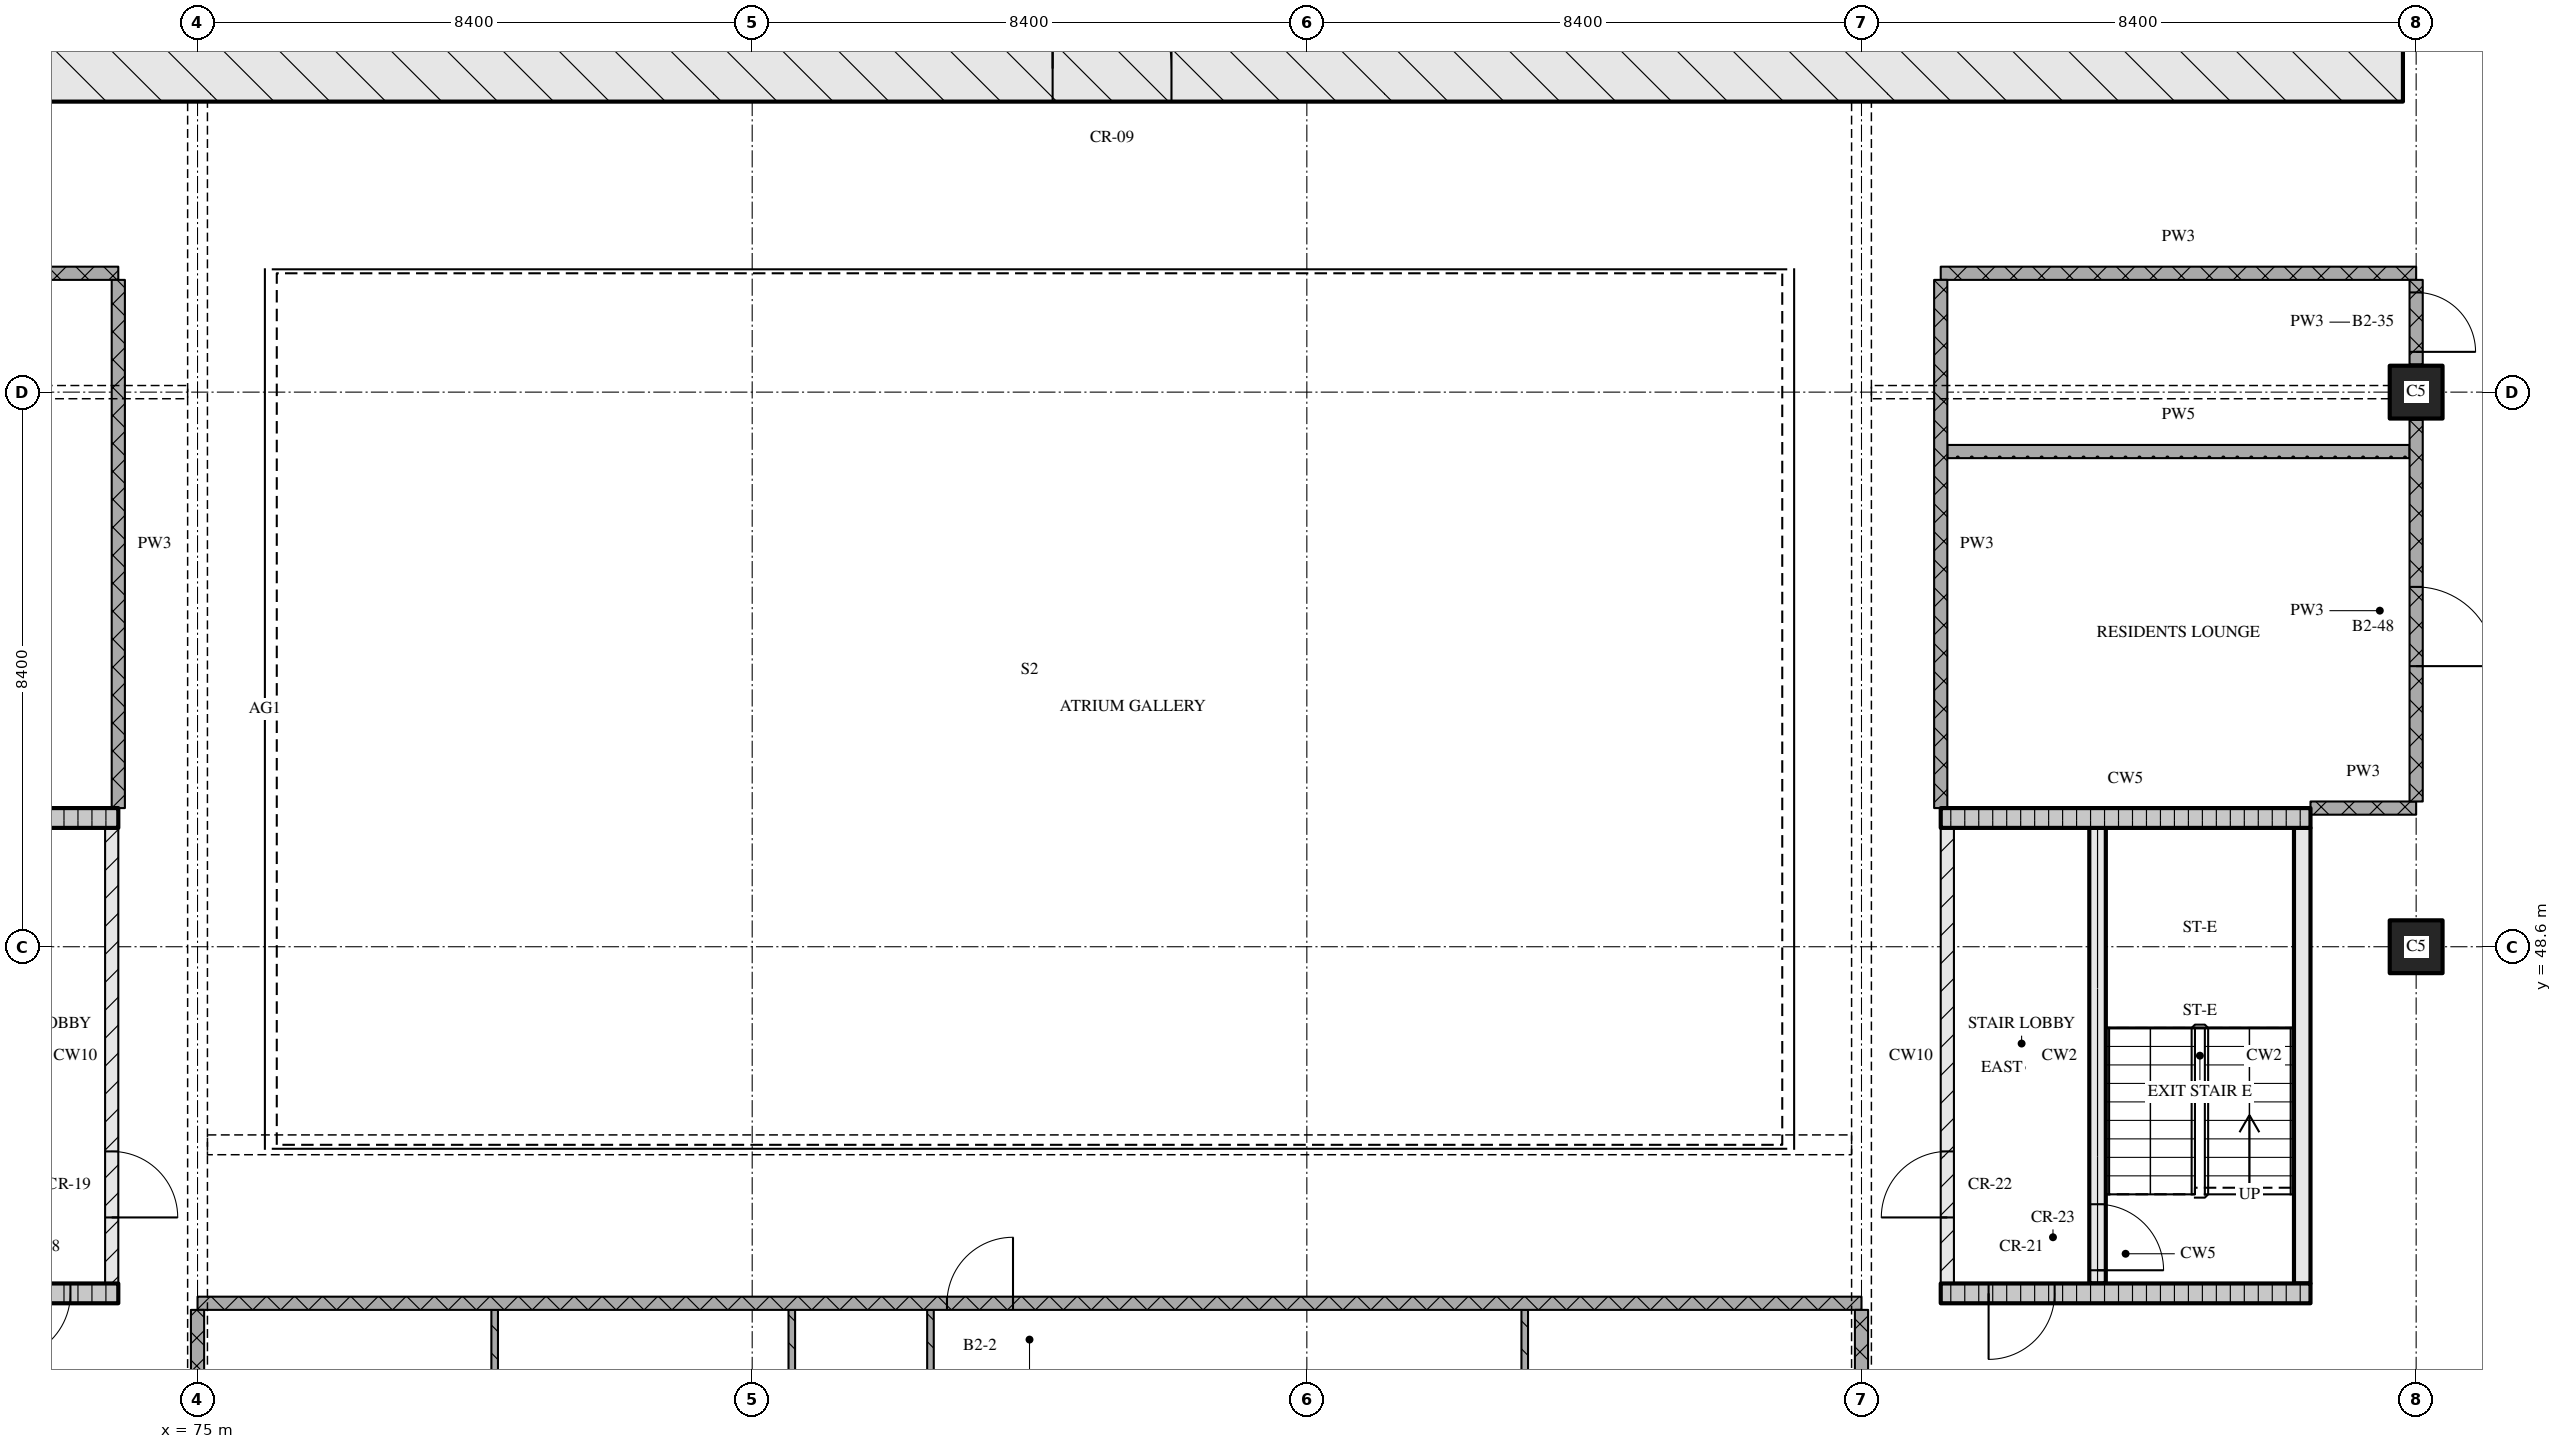
"""IFC4 building model, lengths in metres.
Left out: names, types, materials, properties, quantities, classifications, styles, units other than length and angle.
Written with IfcOpenShell. Run it as: python <this file> out.ifc"""

import sys

from ifc_helpers import new_model, si_unit, direction, frame, frame_2d, origin, origin_2d, place, context, subcontext, project, spatial, rectangle, extrude, element, fill, save


model = new_model("IFC4")
c1 = context("Model", 3, precision=1e-05, world=origin(), true_north=direction((0.0, 1.0)))
c2 = subcontext(c1, "Body", "Model", "MODEL_VIEW")
j1 = project(units=[si_unit("LENGTHUNIT", "METRE"), si_unit("PLANEANGLEUNIT", "RADIAN")], contexts=[c1])
p1 = place(None, origin())
s1 = spatial("IfcSite", under=j1, at=p1, CompositionType="ELEMENT")
p2 = place(p1, origin())
s2 = spatial("IfcBuilding", under=s1, at=p2, CompositionType="ELEMENT")
p3 = place(p2, frame((0.0, 0.0, 106.05)))
s3 = spatial("IfcBuildingStorey", under=s2, at=p3, CompositionType="ELEMENT", Elevation=106.05)
for number, where, z_axis, x_axis in (
    (1, (108.6, 48.6, 0.0), (0.0, 0.0, 1.0), (1.0, 0.0, 0.0)),
    (2, (108.6, 57.0, 0.0), (0.0, 0.0, 1.0), (1.0, 0.0, 0.0)),
):
    element("IfcColumn", number, at=place(p3, frame(where, z_axis=z_axis, x_axis=x_axis)), inside=s3, PredefinedType="COLUMN", context=c2, shape_type="SweptSolid", body=[
        extrude(rectangle(XDim=0.8, YDim=0.8, at=origin_2d()), origin(), (0.0, 0.0, 1.0), 3.6),
    ])
p4 = place(p3, frame((66.8, 61.9, 0.0), z_axis=(0.0, 0.0, 1.0), x_axis=(1.0, 0.0, 0.0)))
e3 = element("IfcWall", 3, at=p4, inside=s3, PredefinedType="SOLIDWALL", context=c2, shape_type="SweptSolid", body=[
    extrude(rectangle(XDim=41.6, YDim=1.0, at=frame_2d((20.8, 0.0))), origin(), (0.0, 0.0, 1.0), 3.32),
])
p5 = place(p4, frame((21.15, 0.0, 0.0)))
e4 = element("IfcOpeningElement", 4, at=p5, cuts=e3, PredefinedType="OPENING", context=c2, shape_type="SweptSolid", body=[
    extrude(rectangle(XDim=1.8, YDim=2.1, at=frame_2d((0.9, 1.05))), frame((0.0, 0.51, 0.0), z_axis=(0.0, -1.0, 0.0), x_axis=(1.0, 0.0, 0.0)), (0.0, 0.0, 1.0), 1.02),
])
p6 = place(p3, frame((68.2, 43.35, 0.0), z_axis=(0.0, 0.0, 1.0), x_axis=(1.0, 0.0, 0.0)))
e5 = element("IfcWall", 5, at=p6, inside=s3, PredefinedType="SOLIDWALL", context=c2, shape_type="SweptSolid", body=[
    extrude(rectangle(XDim=5.6, YDim=0.3, at=frame_2d((2.8, 0.0))), origin(), (0.0, 0.0, 1.0), 3.32),
])
p7 = place(p6, frame((3.875, 0.0, 0.0)))
e6 = element("IfcOpeningElement", 6, at=p7, cuts=e5, PredefinedType="OPENING", context=c2, shape_type="SweptSolid", body=[
    extrude(rectangle(XDim=1.0, YDim=2.1, at=frame_2d((0.5, 1.05))), frame((0.0, 0.16, 0.0), z_axis=(0.0, -1.0, 0.0), x_axis=(1.0, 0.0, 0.0)), (0.0, 0.0, 1.0), 0.32),
])
p8 = place(p3, frame((73.7, 43.5, 0.0), z_axis=(0.0, 0.0, 1.0), x_axis=(0.0, 1.0, 0.0)))
e7 = element("IfcWall", 7, at=p8, inside=s3, PredefinedType="PARTITIONING", context=c2, shape_type="SweptSolid", body=[
    extrude(rectangle(XDim=6.9, YDim=0.2, at=frame_2d((3.45, 0.0))), origin(), (0.0, 0.0, 1.0), 3.32),
])
p9 = place(p8, frame((1.0, 0.0, 0.0)))
e8 = element("IfcOpeningElement", 8, at=p9, cuts=e7, PredefinedType="OPENING", context=c2, shape_type="SweptSolid", body=[
    extrude(rectangle(XDim=1.0, YDim=2.1, at=frame_2d((0.5, 1.05))), frame((0.0, 0.11, 0.0), z_axis=(0.0, -1.0, 0.0), x_axis=(1.0, 0.0, 0.0)), (0.0, 0.0, 1.0), 0.22),
])
p10 = place(p3, frame((68.2, 50.55, 0.0), z_axis=(0.0, 0.0, 1.0), x_axis=(1.0, 0.0, 0.0)))
e9 = element("IfcWall", 9, at=p10, inside=s3, PredefinedType="SOLIDWALL", context=c2, shape_type="SweptSolid", body=[
    extrude(rectangle(XDim=5.6, YDim=0.3, at=frame_2d((2.8, 0.0))), origin(), (0.0, 0.0, 1.0), 3.32),
])
p11 = place(p3, frame((101.4, 43.35, 0.0), z_axis=(0.0, 0.0, 1.0), x_axis=(1.0, 0.0, 0.0)))
e10 = element("IfcWall", 10, at=p11, inside=s3, PredefinedType="SOLIDWALL", context=c2, shape_type="SweptSolid", body=[
    extrude(rectangle(XDim=5.6, YDim=0.3, at=frame_2d((2.8, 0.0))), origin(), (0.0, 0.0, 1.0), 3.32),
])
p12 = place(p11, frame((0.725, 0.0, 0.0)))
e11 = element("IfcOpeningElement", 11, at=p12, cuts=e10, PredefinedType="OPENING", context=c2, shape_type="SweptSolid", body=[
    extrude(rectangle(XDim=1.0, YDim=2.1, at=frame_2d((0.5, 1.05))), frame((0.0, 0.16, 0.0), z_axis=(0.0, -1.0, 0.0), x_axis=(1.0, 0.0, 0.0)), (0.0, 0.0, 1.0), 0.32),
])
p13 = place(p3, frame((101.5, 43.5, 0.0), z_axis=(0.0, 0.0, 1.0), x_axis=(0.0, 1.0, 0.0)))
e12 = element("IfcWall", 12, at=p13, inside=s3, PredefinedType="PARTITIONING", context=c2, shape_type="SweptSolid", body=[
    extrude(rectangle(XDim=6.9, YDim=0.2, at=frame_2d((3.45, 0.0))), origin(), (0.0, 0.0, 1.0), 3.32),
])
p14 = place(p13, frame((1.0, 0.0, 0.0)))
e13 = element("IfcOpeningElement", 13, at=p14, cuts=e12, PredefinedType="OPENING", context=c2, shape_type="SweptSolid", body=[
    extrude(rectangle(XDim=1.0, YDim=2.1, at=frame_2d((0.5, 1.05))), frame((0.0, 0.11, 0.0), z_axis=(0.0, -1.0, 0.0), x_axis=(1.0, 0.0, 0.0)), (0.0, 0.0, 1.0), 0.22),
])
p15 = place(p3, frame((103.775, 43.5, 0.0), z_axis=(0.0, 0.0, 1.0), x_axis=(0.0, 1.0, 0.0)))
e14 = element("IfcWall", 14, at=p15, inside=s3, PredefinedType="SOLIDWALL", context=c2, shape_type="SweptSolid", body=[
    extrude(rectangle(XDim=6.9, YDim=0.25, at=frame_2d((3.45, 0.0))), origin(), (0.0, 0.0, 1.0), 3.32),
])
p16 = place(p15, frame((0.2, 0.0, 0.0)))
e15 = element("IfcOpeningElement", 15, at=p16, cuts=e14, PredefinedType="OPENING", context=c2, shape_type="SweptSolid", body=[
    extrude(rectangle(XDim=1.0, YDim=2.1, at=frame_2d((0.5, 1.05))), frame((0.0, 0.135, 0.0), z_axis=(0.0, -1.0, 0.0), x_axis=(1.0, 0.0, 0.0)), (0.0, 0.0, 1.0), 0.27),
])
p17 = place(p3, frame((106.875, 43.5, 0.0), z_axis=(0.0, 0.0, 1.0), x_axis=(0.0, 1.0, 0.0)))
e16 = element("IfcWall", 16, at=p17, inside=s3, PredefinedType="SOLIDWALL", context=c2, shape_type="SweptSolid", body=[
    extrude(rectangle(XDim=6.9, YDim=0.25, at=frame_2d((3.45, 0.0))), origin(), (0.0, 0.0, 1.0), 3.32),
])
p18 = place(p3, frame((101.4, 50.55, 0.0), z_axis=(0.0, 0.0, 1.0), x_axis=(1.0, 0.0, 0.0)))
e17 = element("IfcWall", 17, at=p18, inside=s3, PredefinedType="SOLIDWALL", context=c2, shape_type="SweptSolid", body=[
    extrude(rectangle(XDim=5.6, YDim=0.3, at=frame_2d((2.8, 0.0))), origin(), (0.0, 0.0, 1.0), 3.32),
])
p19 = place(p3, frame((100.2, 43.2, 0.0), z_axis=(0.0, 0.0, 1.0), x_axis=(-1.0, 0.0, 0.0)))
e18 = element("IfcWall", 18, at=p19, inside=s3, PredefinedType="PARTITIONING", context=c2, shape_type="SweptSolid", body=[
    extrude(rectangle(XDim=25.2, YDim=0.2, at=frame_2d((12.6, 0.0))), origin(), (0.0, 0.0, 1.0), 3.32),
])
p20 = place(p19, frame((12.85, 0.0, 0.0)))
e19 = element("IfcOpeningElement", 19, at=p20, cuts=e18, PredefinedType="OPENING", context=c2, shape_type="SweptSolid", body=[
    extrude(rectangle(XDim=1.0, YDim=2.1, at=frame_2d((0.5, 1.05))), frame((0.0, 0.11, 0.0), z_axis=(0.0, -1.0, 0.0), x_axis=(1.0, 0.0, 0.0)), (0.0, 0.0, 1.0), 0.22),
])
p21 = place(p3, frame((107.0, 50.7, 0.0), z_axis=(0.0, 0.0, 1.0), x_axis=(1.0, 0.0, 0.0)))
e20 = element("IfcWall", 20, at=p21, inside=s3, PredefinedType="PARTITIONING", context=c2, shape_type="SweptSolid", body=[
    extrude(rectangle(XDim=1.6, YDim=0.2, at=frame_2d((0.8, 0.0))), origin(), (0.0, 0.0, 1.0), 3.32),
])
p22 = place(p3, frame((101.5, 56.1, 0.0), z_axis=(0.0, 0.0, 1.0), x_axis=(1.0, 0.0, 0.0)))
e21 = element("IfcWall", 21, at=p22, inside=s3, PredefinedType="PARTITIONING", context=c2, shape_type="SweptSolid", body=[
    extrude(rectangle(XDim=7.0, YDim=0.2, at=frame_2d((3.5, 0.0))), origin(), (0.0, 0.0, 1.0), 3.32),
])
p23 = place(p3, frame((73.8, 58.8, 0.0), z_axis=(0.0, 0.0, 1.0), x_axis=(-1.0, 0.0, 0.0)))
e22 = element("IfcWall", 22, at=p23, inside=s3, PredefinedType="PARTITIONING", context=c2, shape_type="SweptSolid", body=[
    extrude(rectangle(XDim=7.2, YDim=0.2, at=frame_2d((3.6, 0.0))), origin(), (0.0, 0.0, 1.0), 3.32),
])
p24 = place(p23, frame((3.0, 0.0, 0.0)))
e23 = element("IfcOpeningElement", 23, at=p24, cuts=e22, PredefinedType="OPENING", context=c2, shape_type="SweptSolid", body=[
    extrude(rectangle(XDim=1.2, YDim=2.1, at=frame_2d((0.6, 1.05))), frame((0.0, 0.11, 0.0), z_axis=(0.0, -1.0, 0.0), x_axis=(1.0, 0.0, 0.0)), (0.0, 0.0, 1.0), 0.22),
])
p25 = place(p3, frame((101.4, 58.8, 0.0), z_axis=(0.0, 0.0, 1.0), x_axis=(1.0, 0.0, 0.0)))
e24 = element("IfcWall", 24, at=p25, inside=s3, PredefinedType="PARTITIONING", context=c2, shape_type="SweptSolid", body=[
    extrude(rectangle(XDim=7.2, YDim=0.2, at=frame_2d((3.6, 0.0))), origin(), (0.0, 0.0, 1.0), 3.32),
])
p26 = place(p3, frame((73.8, 58.7, 0.0), z_axis=(0.0, 0.0, 1.0), x_axis=(0.0, -1.0, 0.0)))
e25 = element("IfcWall", 25, at=p26, inside=s3, PredefinedType="PARTITIONING", context=c2, shape_type="SweptSolid", body=[
    extrude(rectangle(XDim=8.0, YDim=0.2, at=frame_2d((4.0, 0.0))), origin(), (0.0, 0.0, 1.0), 3.32),
])
p27 = place(p3, frame((75.0, 43.1, 0.0), z_axis=(0.0, 0.0, 1.0), x_axis=(0.0, -1.0, 0.0)))
e26 = element("IfcWall", 26, at=p27, inside=s3, PredefinedType="PARTITIONING", context=c2, shape_type="SweptSolid", body=[
    extrude(rectangle(XDim=2.2, YDim=0.2, at=frame_2d((1.1, 0.0))), origin(), (0.0, 0.0, 1.0), 2.43),
])
for number, where, z_axis, x_axis in (
    (27, (79.5, 43.1, 0.0), (0.0, 0.0, 1.0), (0.0, -1.0, 0.0)),
    (28, (84.0, 43.1, 0.0), (0.0, 0.0, 1.0), (0.0, -1.0, 0.0)),
):
    element("IfcWall", number, at=place(p3, frame(where, z_axis=z_axis, x_axis=x_axis)), inside=s3, PredefinedType="PARTITIONING", context=c2, shape_type="SweptSolid", body=[
        extrude(rectangle(XDim=4.35, YDim=0.1, at=frame_2d((2.175, 0.0))), origin(), (0.0, 0.0, 1.0), 3.32),
    ])
p28 = place(p3, frame((86.1, 38.75, 0.0), z_axis=(0.0, 0.0, 1.0), x_axis=(0.0, 1.0, 0.0)))
e29 = element("IfcWall", 29, at=p28, inside=s3, PredefinedType="PARTITIONING", context=c2, shape_type="SweptSolid", body=[
    extrude(rectangle(XDim=4.35, YDim=0.1, at=frame_2d((2.175, 0.0))), origin(), (0.0, 0.0, 1.0), 3.32),
])
p29 = place(p28, frame((1.75, 0.0, 0.0)))
e30 = element("IfcOpeningElement", 30, at=p29, cuts=e29, PredefinedType="OPENING", context=c2, shape_type="SweptSolid", body=[
    extrude(rectangle(XDim=0.9, YDim=2.1, at=frame_2d((0.45, 1.05))), frame((0.0, 0.06, 0.0), z_axis=(0.0, -1.0, 0.0), x_axis=(1.0, 0.0, 0.0)), (0.0, 0.0, 1.0), 0.12),
])
p30 = place(p3, frame((95.1, 43.1, 0.0), z_axis=(0.0, 0.0, 1.0), x_axis=(0.0, -1.0, 0.0)))
e31 = element("IfcWall", 31, at=p30, inside=s3, PredefinedType="PARTITIONING", context=c2, shape_type="SweptSolid", body=[
    extrude(rectangle(XDim=4.35, YDim=0.1, at=frame_2d((2.175, 0.0))), origin(), (0.0, 0.0, 1.0), 3.32),
])
p31 = place(p3, frame((100.2, 43.1, 0.0), z_axis=(0.0, 0.0, 1.0), x_axis=(0.0, -1.0, 0.0)))
e32 = element("IfcWall", 32, at=p31, inside=s3, PredefinedType="PARTITIONING", context=c2, shape_type="SweptSolid", body=[
    extrude(rectangle(XDim=2.2, YDim=0.2, at=frame_2d((1.1, 0.0))), origin(), (0.0, 0.0, 1.0), 2.43),
])
p32 = place(p3, frame((101.4, 58.7, 0.0), z_axis=(0.0, 0.0, 1.0), x_axis=(0.0, -1.0, 0.0)))
e33 = element("IfcWall", 33, at=p32, inside=s3, PredefinedType="PARTITIONING", context=c2, shape_type="SweptSolid", body=[
    extrude(rectangle(XDim=8.0, YDim=0.2, at=frame_2d((4.0, 0.0))), origin(), (0.0, 0.0, 1.0), 3.32),
])
p33 = place(p3, frame((108.6, 50.8, 0.0), z_axis=(0.0, 0.0, 1.0), x_axis=(0.0, 1.0, 0.0)))
e34 = element("IfcWall", 34, at=p33, inside=s3, PredefinedType="PARTITIONING", context=c2, shape_type="SweptSolid", body=[
    extrude(rectangle(XDim=5.78, YDim=0.2, at=frame_2d((2.89, 0.0))), origin(), (0.0, 0.0, 1.0), 3.32),
])
p34 = place(p33, frame((2.05, 0.0, 0.0)))
e35 = element("IfcOpeningElement", 35, at=p34, cuts=e34, PredefinedType="OPENING", context=c2, shape_type="SweptSolid", body=[
    extrude(rectangle(XDim=1.2, YDim=2.1, at=frame_2d((0.6, 1.05))), frame((0.0, 0.11, 0.0), z_axis=(0.0, -1.0, 0.0), x_axis=(1.0, 0.0, 0.0)), (0.0, 0.0, 1.0), 0.22),
])
p35 = place(p3, frame((108.6, 57.42, 0.0), z_axis=(0.0, 0.0, 1.0), x_axis=(0.0, 1.0, 0.0)))
e36 = element("IfcWall", 36, at=p35, inside=s3, PredefinedType="PARTITIONING", context=c2, shape_type="SweptSolid", body=[
    extrude(rectangle(XDim=1.28, YDim=0.2, at=frame_2d((0.64, 0.0))), origin(), (0.0, 0.0, 1.0), 3.32),
])
p36 = place(p35, frame((0.19, 0.0, 0.0)))
e37 = element("IfcOpeningElement", 37, at=p36, cuts=e36, PredefinedType="OPENING", context=c2, shape_type="SweptSolid", body=[
    extrude(rectangle(XDim=0.9, YDim=2.1, at=frame_2d((0.45, 1.05))), frame((0.0, 0.11, 0.0), z_axis=(0.0, -1.0, 0.0), x_axis=(1.0, 0.0, 0.0)), (0.0, 0.0, 1.0), 0.22),
])
p37 = place(p5, origin())
e38 = element("IfcDoor", 38, at=p37, inside=s3, OperationType="DOUBLE_DOOR_SINGLE_SWING", PredefinedType="DOOR", context=c2, shape_type="SweptSolid", body=[
    extrude(rectangle(XDim=1.8, YDim=2.1, at=frame_2d((0.9, 1.05))), frame((0.0, 0.025, 0.0), z_axis=(0.0, -1.0, 0.0), x_axis=(1.0, 0.0, 0.0)), (0.0, 0.0, 1.0), 0.05),
])
fill(e4, e38)
p38 = place(p7, origin())
e39 = element("IfcDoor", 39, at=p38, inside=s3, OperationType="SINGLE_SWING_RIGHT", PredefinedType="DOOR", context=c2, shape_type="SweptSolid", body=[
    extrude(rectangle(XDim=1.0, YDim=2.1, at=frame_2d((0.5, 1.05))), frame((0.0, 0.025, 0.0), z_axis=(0.0, -1.0, 0.0), x_axis=(1.0, 0.0, 0.0)), (0.0, 0.0, 1.0), 0.05),
])
fill(e6, e39)
p39 = place(p9, origin())
e40 = element("IfcDoor", 40, at=p39, inside=s3, OperationType="SINGLE_SWING_RIGHT", PredefinedType="DOOR", context=c2, shape_type="SweptSolid", body=[
    extrude(rectangle(XDim=1.0, YDim=2.1, at=frame_2d((0.5, 1.05))), frame((0.0, 0.025, 0.0), z_axis=(0.0, -1.0, 0.0), x_axis=(1.0, 0.0, 0.0)), (0.0, 0.0, 1.0), 0.05),
])
fill(e8, e40)
p40 = place(p12, origin())
e41 = element("IfcDoor", 41, at=p40, inside=s3, OperationType="SINGLE_SWING_RIGHT", PredefinedType="DOOR", context=c2, shape_type="SweptSolid", body=[
    extrude(rectangle(XDim=1.0, YDim=2.1, at=frame_2d((0.5, 1.05))), frame((0.0, 0.025, 0.0), z_axis=(0.0, -1.0, 0.0), x_axis=(1.0, 0.0, 0.0)), (0.0, 0.0, 1.0), 0.05),
])
fill(e11, e41)
p41 = place(p16, origin())
e42 = element("IfcDoor", 42, at=p41, inside=s3, OperationType="SINGLE_SWING_RIGHT", PredefinedType="DOOR", context=c2, shape_type="SweptSolid", body=[
    extrude(rectangle(XDim=1.0, YDim=2.1, at=frame_2d((0.5, 1.05))), frame((0.0, 0.025, 0.0), z_axis=(0.0, -1.0, 0.0), x_axis=(1.0, 0.0, 0.0)), (0.0, 0.0, 1.0), 0.05),
])
fill(e15, e42)
p42 = place(p14, origin())
e43 = element("IfcDoor", 43, at=p42, inside=s3, OperationType="SINGLE_SWING_LEFT", PredefinedType="DOOR", context=c2, shape_type="SweptSolid", body=[
    extrude(rectangle(XDim=1.0, YDim=2.1, at=frame_2d((0.5, 1.05))), frame((0.0, 0.025, 0.0), z_axis=(0.0, -1.0, 0.0), x_axis=(1.0, 0.0, 0.0)), (0.0, 0.0, 1.0), 0.05),
])
fill(e13, e43)
p43 = place(p20, origin())
e44 = element("IfcDoor", 44, at=p43, inside=s3, OperationType="SINGLE_SWING_RIGHT", PredefinedType="DOOR", context=c2, shape_type="SweptSolid", body=[
    extrude(rectangle(XDim=1.0, YDim=2.1, at=frame_2d((0.5, 1.05))), frame((0.0, 0.025, 0.0), z_axis=(0.0, -1.0, 0.0), x_axis=(1.0, 0.0, 0.0)), (0.0, 0.0, 1.0), 0.05),
])
fill(e19, e44)
p44 = place(p34, origin())
e45 = element("IfcDoor", 45, at=p44, inside=s3, OperationType="SINGLE_SWING_RIGHT", PredefinedType="DOOR", context=c2, shape_type="SweptSolid", body=[
    extrude(rectangle(XDim=1.2, YDim=2.1, at=frame_2d((0.6, 1.05))), frame((0.0, 0.025, 0.0), z_axis=(0.0, -1.0, 0.0), x_axis=(1.0, 0.0, 0.0)), (0.0, 0.0, 1.0), 0.05),
])
fill(e35, e45)
p45 = place(p36, origin())
e46 = element("IfcDoor", 46, at=p45, inside=s3, OperationType="SINGLE_SWING_RIGHT", PredefinedType="DOOR", context=c2, shape_type="SweptSolid", body=[
    extrude(rectangle(XDim=0.9, YDim=2.1, at=frame_2d((0.45, 1.05))), frame((0.0, 0.025, 0.0), z_axis=(0.0, -1.0, 0.0), x_axis=(1.0, 0.0, 0.0)), (0.0, 0.0, 1.0), 0.05),
])
fill(e37, e46)
save(model, sys.argv[1])
